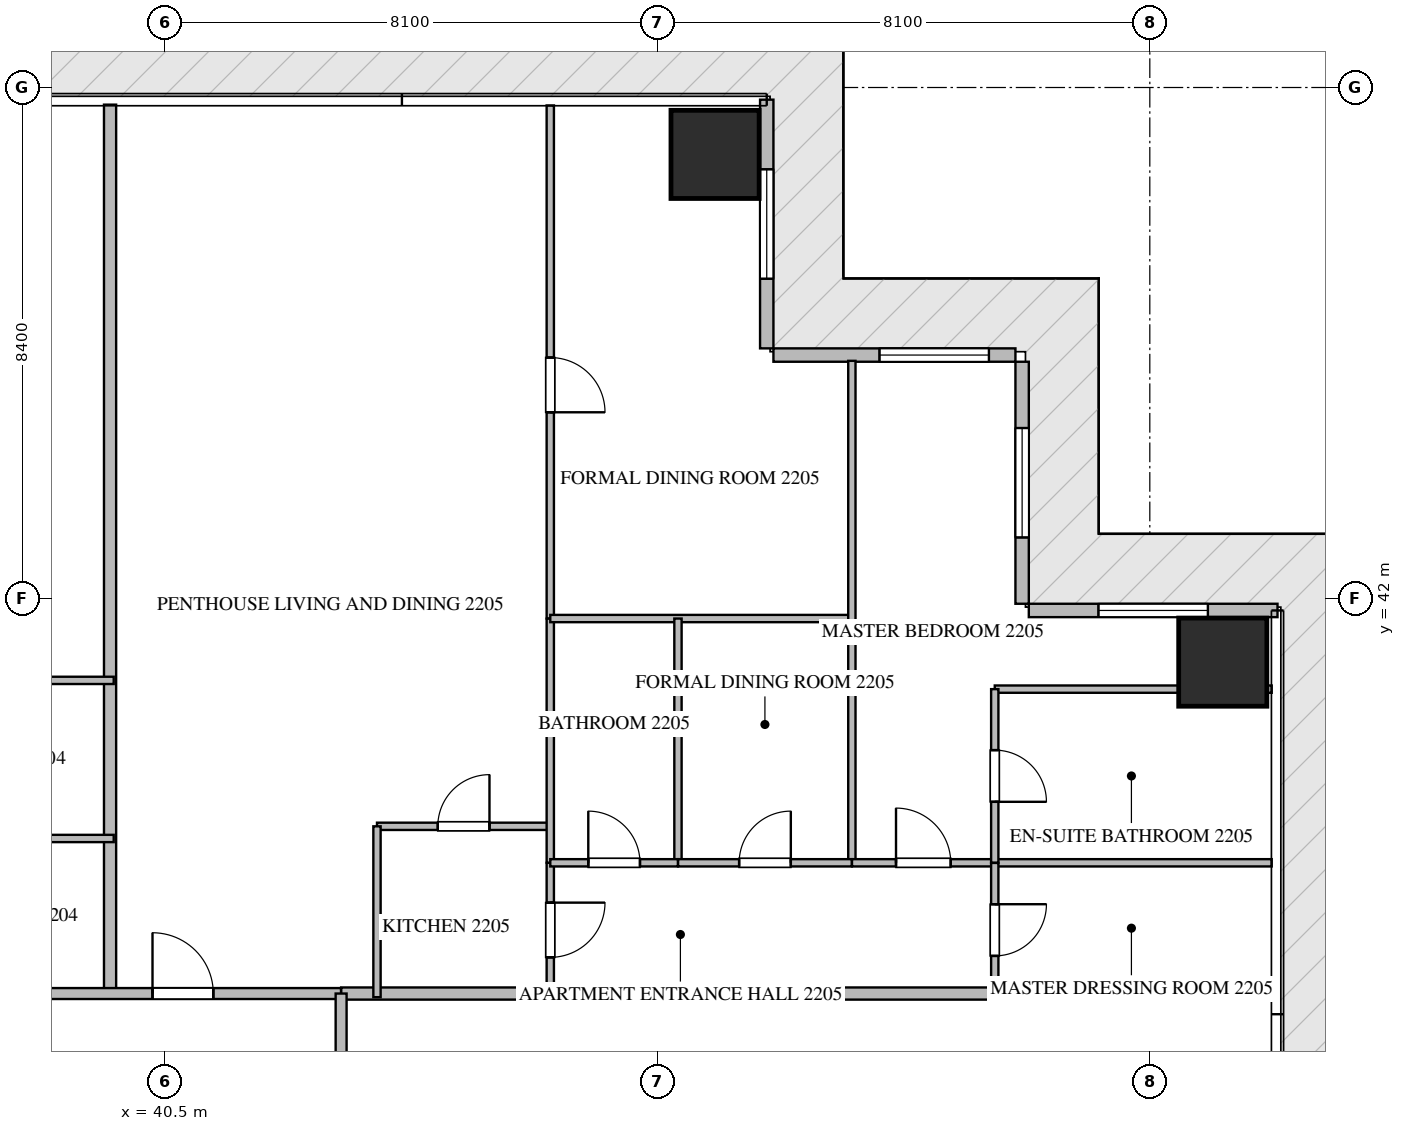
"""IFC4 building model, lengths in metres.
Left out: names, types, materials, properties, quantities, classifications, styles, units other than length and angle.
Written with IfcOpenShell. Run it as: python <this file> out.ifc"""

import sys

from ifc_helpers import new_model, si_unit, direction, frame, frame_2d, origin, origin_2d, place, context, subcontext, project, spatial, rectangle, extrude, source, transform, mapped, element, fill, save


model = new_model("IFC4")
c1 = context("Model", 3, precision=1e-05, world=origin(), true_north=direction((0.0, 1.0)))
c2 = subcontext(c1, "Body", "Model", "MODEL_VIEW")
j1 = project(units=[si_unit("LENGTHUNIT", "METRE"), si_unit("PLANEANGLEUNIT", "RADIAN")], contexts=[c1])
p1 = place(None, origin())
s1 = spatial("IfcSite", under=j1, at=p1, CompositionType="ELEMENT")
p2 = place(p1, origin())
s2 = spatial("IfcBuilding", under=s1, at=p2, CompositionType="ELEMENT")
p3 = place(p2, frame((0.0, 0.0, 90.45)))
s3 = spatial("IfcBuildingStorey", under=s2, at=p3, CompositionType="ELEMENT", Elevation=90.45)
m1 = source(origin(), c2, "Body", "SweptSolid", [
    extrude(rectangle(XDim=1.45, YDim=1.45, at=origin_2d()), origin(), (0.0, 0.0, 1.0), 3.75),
])
for number, where, z_axis, x_axis in (
    (1, (49.55, 49.3, -0.26), (0.0, 0.0, 1.0), (1.0, 0.0, 0.0)),
    (2, (57.9, 40.95, -0.26), (0.0, 0.0, 1.0), (1.0, 0.0, 0.0)),
):
    element("IfcColumn", number, at=place(p3, frame(where, z_axis=z_axis, x_axis=x_axis)), inside=s3, PredefinedType="COLUMN", context=c2, shape_type="MappedRepresentation", body=[
        mapped(m1, transform((0.0, 0.0, 0.0), scale=1.0)),
    ])
p4 = place(p3, frame((58.8, 41.8, 0.0), z_axis=(0.0, 0.0, 1.0), x_axis=(-1.0, 0.0, 0.0)))
e3 = element("IfcWall", 3, at=p4, inside=s3, PredefinedType="ELEMENTEDWALL", context=c2, shape_type="SweptSolid", body=[
    extrude(rectangle(XDim=4.09, YDim=0.22, at=frame_2d((2.045, 0.0))), origin(), (0.0, 0.0, 1.0), 3.475),
])
p5 = place(p4, frame((1.145, 0.0, 0.65)))
e4 = element("IfcOpeningElement", 4, at=p5, cuts=e3, PredefinedType="OPENING", context=c2, shape_type="SweptSolid", body=[
    extrude(rectangle(XDim=1.8, YDim=2.1, at=frame_2d((0.9, 1.05))), frame((0.0, 0.12, 0.0), z_axis=(0.0, -1.0, 0.0), x_axis=(1.0, 0.0, 0.0)), (0.0, 0.0, 1.0), 0.24),
])
p6 = place(p3, frame((54.6, 41.91, 0.0), z_axis=(0.0, 0.0, 1.0), x_axis=(0.0, 1.0, 0.0)))
e5 = element("IfcWall", 5, at=p6, inside=s3, PredefinedType="ELEMENTEDWALL", context=c2, shape_type="SweptSolid", body=[
    extrude(rectangle(XDim=3.98, YDim=0.22, at=frame_2d((1.99, 0.0))), origin(), (0.0, 0.0, 1.0), 3.475),
])
p7 = place(p6, frame((1.09, 0.0, 0.65)))
e6 = element("IfcOpeningElement", 6, at=p7, cuts=e5, PredefinedType="OPENING", context=c2, shape_type="SweptSolid", body=[
    extrude(rectangle(XDim=1.8, YDim=2.1, at=frame_2d((0.9, 1.05))), frame((0.0, 0.12, 0.0), z_axis=(0.0, -1.0, 0.0), x_axis=(1.0, 0.0, 0.0)), (0.0, 0.0, 1.0), 0.24),
])
p8 = place(p3, frame((54.49, 46.0, 0.0), z_axis=(0.0, 0.0, 1.0), x_axis=(-1.0, 0.0, 0.0)))
e7 = element("IfcWall", 7, at=p8, inside=s3, PredefinedType="ELEMENTEDWALL", context=c2, shape_type="SweptSolid", body=[
    extrude(rectangle(XDim=3.98, YDim=0.22, at=frame_2d((1.99, 0.0))), origin(), (0.0, 0.0, 1.0), 3.475),
])
p9 = place(p8, frame((0.436, 0.0, 0.65)))
e8 = element("IfcOpeningElement", 8, at=p9, cuts=e7, PredefinedType="OPENING", context=c2, shape_type="SweptSolid", body=[
    extrude(rectangle(XDim=1.8, YDim=2.1, at=frame_2d((0.9, 1.05))), frame((0.0, 0.12, 0.0), z_axis=(0.0, -1.0, 0.0), x_axis=(1.0, 0.0, 0.0)), (0.0, 0.0, 1.0), 0.24),
])
p10 = place(p3, frame((50.4, 46.11, 0.0), z_axis=(0.0, 0.0, 1.0), x_axis=(0.0, 1.0, 0.0)))
e9 = element("IfcWall", 9, at=p10, inside=s3, PredefinedType="ELEMENTEDWALL", context=c2, shape_type="SweptSolid", body=[
    extrude(rectangle(XDim=4.09, YDim=0.22, at=frame_2d((2.045, 0.0))), origin(), (0.0, 0.0, 1.0), 3.475),
])
p11 = place(p10, frame((1.145, 0.0, 0.65)))
e10 = element("IfcOpeningElement", 10, at=p11, cuts=e9, PredefinedType="OPENING", context=c2, shape_type="SweptSolid", body=[
    extrude(rectangle(XDim=1.8, YDim=2.1, at=frame_2d((0.9, 1.05))), frame((0.0, 0.12, 0.0), z_axis=(0.0, -1.0, 0.0), x_axis=(1.0, 0.0, 0.0)), (0.0, 0.0, 1.0), 0.24),
])
p12 = place(p3, frame((39.6, 35.5, 0.0), z_axis=(0.0, 0.0, 1.0), x_axis=(0.0, 1.0, 0.0)))
e11 = element("IfcWall", 11, at=p12, inside=s3, PredefinedType="PARTITIONING", context=c2, shape_type="SweptSolid", body=[
    extrude(rectangle(XDim=14.618, YDim=0.2, at=frame_2d((7.309, 0.0))), origin(), (0.0, 0.0, 1.0), 3.49),
])
p13 = place(p3, frame((43.4, 35.5, 0.0), z_axis=(0.0, 0.0, 1.0), x_axis=(1.0, 0.0, 0.0)))
e12 = element("IfcWall", 12, at=p13, inside=s3, PredefinedType="PARTITIONING", context=c2, shape_type="SweptSolid", body=[
    extrude(rectangle(XDim=15.318, YDim=0.2, at=frame_2d((7.659, 0.0))), origin(), (0.0, 0.0, 1.0), 3.49),
])
p14 = place(p3, frame((21.402, 35.5, 0.0), z_axis=(0.0, 0.0, 1.0), x_axis=(1.0, 0.0, 0.0)))
e13 = element("IfcWall", 13, at=p14, inside=s3, PredefinedType="PARTITIONING", context=c2, shape_type="SweptSolid", body=[
    extrude(rectangle(XDim=21.996, YDim=0.18, at=frame_2d((10.998, 0.0))), origin(), (0.0, 0.0, 1.0), 3.49),
])
p15 = place(p14, frame((1.96, 0.0, 0.0)))
e14 = element("IfcOpeningElement", 14, at=p15, cuts=e13, PredefinedType="OPENING", context=c2, shape_type="SweptSolid", body=[
    extrude(rectangle(XDim=1.0, YDim=2.15, at=frame_2d((0.5, 1.075))), frame((0.0, 0.1, 0.0), z_axis=(0.0, -1.0, 0.0), x_axis=(1.0, 0.0, 0.0)), (0.0, 0.0, 1.0), 0.2),
])
p16 = place(p14, frame((5.249, 0.0, 0.0)))
e15 = element("IfcOpeningElement", 15, at=p16, cuts=e13, PredefinedType="OPENING", context=c2, shape_type="SweptSolid", body=[
    extrude(rectangle(XDim=1.0, YDim=2.15, at=frame_2d((0.5, 1.075))), frame((0.0, 0.1, 0.0), z_axis=(0.0, -1.0, 0.0), x_axis=(1.0, 0.0, 0.0)), (0.0, 0.0, 1.0), 0.2),
])
p17 = place(p14, frame((11.653, 0.0, 0.0)))
e16 = element("IfcOpeningElement", 16, at=p17, cuts=e13, PredefinedType="OPENING", context=c2, shape_type="SweptSolid", body=[
    extrude(rectangle(XDim=1.0, YDim=2.15, at=frame_2d((0.5, 1.075))), frame((0.0, 0.1, 0.0), z_axis=(0.0, -1.0, 0.0), x_axis=(1.0, 0.0, 0.0)), (0.0, 0.0, 1.0), 0.2),
])
p18 = place(p14, frame((18.896, 0.0, 0.0)))
e17 = element("IfcOpeningElement", 17, at=p18, cuts=e13, PredefinedType="OPENING", context=c2, shape_type="SweptSolid", body=[
    extrude(rectangle(XDim=1.0, YDim=2.15, at=frame_2d((0.5, 1.075))), frame((0.0, 0.1, 0.0), z_axis=(0.0, -1.0, 0.0), x_axis=(1.0, 0.0, 0.0)), (0.0, 0.0, 1.0), 0.2),
])
p19 = place(p3, frame((43.4, 14.9, 0.0), z_axis=(0.0, 0.0, 1.0), x_axis=(0.0, 1.0, 0.0)))
e18 = element("IfcWall", 18, at=p19, inside=s3, PredefinedType="PARTITIONING", context=c2, shape_type="SweptSolid", body=[
    extrude(rectangle(XDim=20.6, YDim=0.18, at=frame_2d((10.3, 0.0))), origin(), (0.0, 0.0, 1.0), 3.49),
])
p20 = place(p19, frame((3.469, 0.0, 0.0)))
e19 = element("IfcOpeningElement", 19, at=p20, cuts=e18, PredefinedType="OPENING", context=c2, shape_type="SweptSolid", body=[
    extrude(rectangle(XDim=1.0, YDim=2.15, at=frame_2d((0.5, 1.075))), frame((0.0, 0.1, 0.0), z_axis=(0.0, -1.0, 0.0), x_axis=(1.0, 0.0, 0.0)), (0.0, 0.0, 1.0), 0.2),
])
p21 = place(p19, frame((11.074, 0.0, 0.0)))
e20 = element("IfcOpeningElement", 20, at=p21, cuts=e18, PredefinedType="OPENING", context=c2, shape_type="SweptSolid", body=[
    extrude(rectangle(XDim=1.0, YDim=2.15, at=frame_2d((0.5, 1.075))), frame((0.0, 0.1, 0.0), z_axis=(0.0, -1.0, 0.0), x_axis=(1.0, 0.0, 0.0)), (0.0, 0.0, 1.0), 0.2),
])
p22 = place(p19, frame((17.78, 0.0, 0.0)))
e21 = element("IfcOpeningElement", 21, at=p22, cuts=e18, PredefinedType="OPENING", context=c2, shape_type="SweptSolid", body=[
    extrude(rectangle(XDim=1.0, YDim=2.15, at=frame_2d((0.5, 1.075))), frame((0.0, 0.1, 0.0), z_axis=(0.0, -1.0, 0.0), x_axis=(1.0, 0.0, 0.0)), (0.0, 0.0, 1.0), 0.2),
])
for number, where, z_axis, x_axis in (
    (22, (35.3, 38.05, 0.0), (0.0, 0.0, 1.0), (1.0, 0.0, 0.0)),
    (23, (35.3, 40.65, 0.0), (0.0, 0.0, 1.0), (1.0, 0.0, 0.0)),
):
    element("IfcWall", number, at=place(p3, frame(where, z_axis=z_axis, x_axis=x_axis)), inside=s3, PredefinedType="PARTITIONING", context=c2, shape_type="SweptSolid", body=[
        extrude(rectangle(XDim=4.36, YDim=0.12, at=frame_2d((2.18, 0.0))), origin(), (0.0, 0.0, 1.0), 3.49),
    ])
p23 = place(p3, frame((43.99, 38.25, 0.0), z_axis=(0.0, 0.0, 1.0), x_axis=(1.0, 0.0, 0.0)))
e24 = element("IfcWall", 24, at=p23, inside=s3, PredefinedType="PARTITIONING", context=c2, shape_type="SweptSolid", body=[
    extrude(rectangle(XDim=2.85, YDim=0.12, at=frame_2d((1.425, 0.0))), origin(), (0.0, 0.0, 1.0), 3.49),
])
p24 = place(p23, frame((1.0, 0.0, 0.0)))
e25 = element("IfcOpeningElement", 25, at=p24, cuts=e24, PredefinedType="OPENING", context=c2, shape_type="SweptSolid", body=[
    extrude(rectangle(XDim=0.85, YDim=2.1, at=frame_2d((0.425, 1.05))), frame((0.0, 0.07, 0.0), z_axis=(0.0, -1.0, 0.0), x_axis=(1.0, 0.0, 0.0)), (0.0, 0.0, 1.0), 0.14),
])
p25 = place(p3, frame((43.99, 38.25, 0.0), z_axis=(0.0, 0.0, 1.0), x_axis=(0.0, -1.0, 0.0)))
e26 = element("IfcWall", 26, at=p25, inside=s3, PredefinedType="PARTITIONING", context=c2, shape_type="SweptSolid", body=[
    extrude(rectangle(XDim=2.81, YDim=0.12, at=frame_2d((1.405, 0.0))), origin(), (0.0, 0.0, 1.0), 3.49),
])
p26 = place(p3, frame((46.84, 37.65, 0.0), z_axis=(0.0, 0.0, 1.0), x_axis=(0.0, -1.0, 0.0)))
e27 = element("IfcWall", 27, at=p26, inside=s3, PredefinedType="PARTITIONING", context=c2, shape_type="SweptSolid", body=[
    extrude(rectangle(XDim=2.21, YDim=0.12, at=frame_2d((1.105, 0.0))), origin(), (0.0, 0.0, 1.0), 3.49),
])
p27 = place(p26, frame((0.655, 0.0, 0.0)))
e28 = element("IfcOpeningElement", 28, at=p27, cuts=e27, PredefinedType="OPENING", context=c2, shape_type="SweptSolid", body=[
    extrude(rectangle(XDim=0.9, YDim=2.1, at=frame_2d((0.45, 1.05))), frame((0.0, 0.07, 0.0), z_axis=(0.0, -1.0, 0.0), x_axis=(1.0, 0.0, 0.0)), (0.0, 0.0, 1.0), 0.14),
])
p28 = place(p3, frame((46.84, 50.105, 0.0), z_axis=(0.0, 0.0, 1.0), x_axis=(0.0, -1.0, 0.0)))
e29 = element("IfcWall", 29, at=p28, inside=s3, PredefinedType="PARTITIONING", context=c2, shape_type="SweptSolid", body=[
    extrude(rectangle(XDim=8.438, YDim=0.12, at=frame_2d((4.219, 0.0))), origin(), (0.0, 0.0, 1.0), 3.49),
])
p29 = place(p28, frame((4.146, 0.0, 0.0)))
e30 = element("IfcOpeningElement", 30, at=p29, cuts=e29, PredefinedType="OPENING", context=c2, shape_type="SweptSolid", body=[
    extrude(rectangle(XDim=0.9, YDim=2.1, at=frame_2d((0.45, 1.05))), frame((0.0, 0.07, 0.0), z_axis=(0.0, -1.0, 0.0), x_axis=(1.0, 0.0, 0.0)), (0.0, 0.0, 1.0), 0.14),
])
p30 = place(p3, frame((46.84, 41.665, 0.0), z_axis=(0.0, 0.0, 1.0), x_axis=(0.0, -1.0, 0.0)))
e31 = element("IfcWall", 31, at=p30, inside=s3, PredefinedType="PARTITIONING", context=c2, shape_type="SweptSolid", body=[
    extrude(rectangle(XDim=4.013, YDim=0.12, at=frame_2d((2.006, 0.0))), origin(), (0.0, 0.0, 1.0), 3.49),
])
p31 = place(p3, frame((46.84, 41.667, 0.0), z_axis=(0.0, 0.0, 1.0), x_axis=(1.0, 0.0, 0.0)))
e32 = element("IfcWall", 32, at=p31, inside=s3, PredefinedType="PARTITIONING", context=c2, shape_type="SweptSolid", body=[
    extrude(rectangle(XDim=4.96, YDim=0.12, at=frame_2d((2.48, 0.0))), origin(), (0.0, 0.0, 1.0), 3.49),
])
p32 = place(p3, frame((51.8, 45.905, 0.0), z_axis=(0.0, 0.0, 1.0), x_axis=(0.0, -1.0, 0.0)))
e33 = element("IfcWall", 33, at=p32, inside=s3, PredefinedType="PARTITIONING", context=c2, shape_type="SweptSolid", body=[
    extrude(rectangle(XDim=8.255, YDim=0.12, at=frame_2d((4.127, 0.0))), origin(), (0.0, 0.0, 1.0), 3.49),
])
p33 = place(p3, frame((48.94, 41.667, 0.0), z_axis=(0.0, 0.0, 1.0), x_axis=(0.0, -1.0, 0.0)))
e34 = element("IfcWall", 34, at=p33, inside=s3, PredefinedType="PARTITIONING", context=c2, shape_type="SweptSolid", body=[
    extrude(rectangle(XDim=4.017, YDim=0.12, at=frame_2d((2.009, 0.0))), origin(), (0.0, 0.0, 1.0), 3.49),
])
p34 = place(p3, frame((46.84, 37.65, 0.0), z_axis=(0.0, 0.0, 1.0), x_axis=(1.0, 0.0, 0.0)))
e35 = element("IfcWall", 35, at=p34, inside=s3, PredefinedType="PARTITIONING", context=c2, shape_type="SweptSolid", body=[
    extrude(rectangle(XDim=2.1, YDim=0.12, at=frame_2d((1.05, 0.0))), origin(), (0.0, 0.0, 1.0), 3.49),
])
p35 = place(p34, frame((0.625, 0.0, 0.0)))
e36 = element("IfcOpeningElement", 36, at=p35, cuts=e35, PredefinedType="OPENING", context=c2, shape_type="SweptSolid", body=[
    extrude(rectangle(XDim=0.85, YDim=2.1, at=frame_2d((0.425, 1.05))), frame((0.0, 0.07, 0.0), z_axis=(0.0, -1.0, 0.0), x_axis=(1.0, 0.0, 0.0)), (0.0, 0.0, 1.0), 0.14),
])
p36 = place(p3, frame((48.942, 37.65, 0.0), z_axis=(0.0, 0.0, 1.0), x_axis=(1.0, 0.0, 0.0)))
e37 = element("IfcWall", 37, at=p36, inside=s3, PredefinedType="PARTITIONING", context=c2, shape_type="SweptSolid", body=[
    extrude(rectangle(XDim=2.858, YDim=0.12, at=frame_2d((1.429, 0.0))), origin(), (0.0, 0.0, 1.0), 3.49),
])
p37 = place(p36, frame((1.004, 0.0, 0.0)))
e38 = element("IfcOpeningElement", 38, at=p37, cuts=e37, PredefinedType="OPENING", context=c2, shape_type="SweptSolid", body=[
    extrude(rectangle(XDim=0.85, YDim=2.1, at=frame_2d((0.425, 1.05))), frame((0.0, 0.07, 0.0), z_axis=(0.0, -1.0, 0.0), x_axis=(1.0, 0.0, 0.0)), (0.0, 0.0, 1.0), 0.14),
])
p38 = place(p3, frame((51.802, 37.65, 0.0), z_axis=(0.0, 0.0, 1.0), x_axis=(1.0, 0.0, 0.0)))
e39 = element("IfcWall", 39, at=p38, inside=s3, PredefinedType="PARTITIONING", context=c2, shape_type="SweptSolid", body=[
    extrude(rectangle(XDim=2.348, YDim=0.12, at=frame_2d((1.174, 0.0))), origin(), (0.0, 0.0, 1.0), 3.49),
])
p39 = place(p38, frame((0.724, 0.0, 0.0)))
e40 = element("IfcOpeningElement", 40, at=p39, cuts=e39, PredefinedType="OPENING", context=c2, shape_type="SweptSolid", body=[
    extrude(rectangle(XDim=0.9, YDim=2.1, at=frame_2d((0.45, 1.05))), frame((0.0, 0.07, 0.0), z_axis=(0.0, -1.0, 0.0), x_axis=(1.0, 0.0, 0.0)), (0.0, 0.0, 1.0), 0.14),
])
p40 = place(p3, frame((54.15, 40.506, 0.0), z_axis=(0.0, 0.0, 1.0), x_axis=(1.0, 0.0, 0.0)))
e41 = element("IfcWall", 41, at=p40, inside=s3, PredefinedType="PARTITIONING", context=c2, shape_type="SweptSolid", body=[
    extrude(rectangle(XDim=4.555, YDim=0.12, at=frame_2d((2.278, 0.0))), origin(), (0.0, 0.0, 1.0), 3.49),
])
p41 = place(p3, frame((54.152, 37.65, 0.0), z_axis=(0.0, 0.0, 1.0), x_axis=(1.0, 0.0, 0.0)))
e42 = element("IfcWall", 42, at=p41, inside=s3, PredefinedType="PARTITIONING", context=c2, shape_type="SweptSolid", body=[
    extrude(rectangle(XDim=4.553, YDim=0.12, at=frame_2d((2.276, 0.0))), origin(), (0.0, 0.0, 1.0), 3.49),
])
p42 = place(p3, frame((54.15, 40.506, 0.0), z_axis=(0.0, 0.0, 1.0), x_axis=(0.0, -1.0, 0.0)))
e43 = element("IfcWall", 43, at=p42, inside=s3, PredefinedType="PARTITIONING", context=c2, shape_type="SweptSolid", body=[
    extrude(rectangle(XDim=2.856, YDim=0.12, at=frame_2d((1.428, 0.0))), origin(), (0.0, 0.0, 1.0), 3.49),
])
p43 = place(p42, frame((1.003, 0.0, 0.0)))
e44 = element("IfcOpeningElement", 44, at=p43, cuts=e43, PredefinedType="OPENING", context=c2, shape_type="SweptSolid", body=[
    extrude(rectangle(XDim=0.85, YDim=2.1, at=frame_2d((0.425, 1.05))), frame((0.0, 0.07, 0.0), z_axis=(0.0, -1.0, 0.0), x_axis=(1.0, 0.0, 0.0)), (0.0, 0.0, 1.0), 0.14),
])
p44 = place(p3, frame((54.15, 37.648, 0.0), z_axis=(0.0, 0.0, 1.0), x_axis=(0.0, -1.0, 0.0)))
e45 = element("IfcWall", 45, at=p44, inside=s3, PredefinedType="PARTITIONING", context=c2, shape_type="SweptSolid", body=[
    extrude(rectangle(XDim=2.208, YDim=0.12, at=frame_2d((1.104, 0.0))), origin(), (0.0, 0.0, 1.0), 3.49),
])
p45 = place(p44, frame((0.679, 0.0, 0.0)))
e46 = element("IfcOpeningElement", 46, at=p45, cuts=e45, PredefinedType="OPENING", context=c2, shape_type="SweptSolid", body=[
    extrude(rectangle(XDim=0.85, YDim=2.1, at=frame_2d((0.425, 1.05))), frame((0.0, 0.07, 0.0), z_axis=(0.0, -1.0, 0.0), x_axis=(1.0, 0.0, 0.0)), (0.0, 0.0, 1.0), 0.14),
])
m2 = source(origin(), c2, "Body", "SweptSolid", [
    extrude(rectangle(XDim=1.8, YDim=2.1, at=frame_2d((0.9, 1.05))), frame((0.0, 0.03, 0.0), z_axis=(0.0, -1.0, 0.0), x_axis=(1.0, 0.0, 0.0)), (0.0, 0.0, 1.0), 0.06),
])
p46 = place(p5, origin())
e47 = element("IfcWindow", 47, at=p46, inside=s3, PartitioningType="SINGLE_PANEL", PredefinedType="WINDOW", context=c2, shape_type="MappedRepresentation", body=[
    mapped(m2, transform((0.0, 0.0, 0.0), scale=1.0)),
])
fill(e4, e47)
p47 = place(p7, origin())
e48 = element("IfcWindow", 48, at=p47, inside=s3, PartitioningType="SINGLE_PANEL", PredefinedType="WINDOW", context=c2, shape_type="MappedRepresentation", body=[
    mapped(m2, transform((0.0, 0.0, 0.0), scale=1.0)),
])
fill(e6, e48)
p48 = place(p9, origin())
e49 = element("IfcWindow", 49, at=p48, inside=s3, PartitioningType="SINGLE_PANEL", PredefinedType="WINDOW", context=c2, shape_type="MappedRepresentation", body=[
    mapped(m2, transform((0.0, 0.0, 0.0), scale=1.0)),
])
fill(e8, e49)
p49 = place(p11, origin())
e50 = element("IfcWindow", 50, at=p49, inside=s3, PartitioningType="SINGLE_PANEL", PredefinedType="WINDOW", context=c2, shape_type="MappedRepresentation", body=[
    mapped(m2, transform((0.0, 0.0, 0.0), scale=1.0)),
])
fill(e10, e50)
m3 = source(origin(), c2, "Body", "SweptSolid", [
    extrude(rectangle(XDim=1.0, YDim=2.15, at=frame_2d((0.5, 1.075))), frame((0.0, 0.025, 0.0), z_axis=(0.0, -1.0, 0.0), x_axis=(1.0, 0.0, 0.0)), (0.0, 0.0, 1.0), 0.05),
])
p50 = place(p18, origin())
e51 = element("IfcDoor", 51, at=p50, inside=s3, OperationType="SINGLE_SWING_LEFT", PredefinedType="DOOR", context=c2, shape_type="MappedRepresentation", body=[
    mapped(m3, transform((0.0, 0.0, 0.0), scale=1.0)),
])
fill(e17, e51)
m4 = source(origin(), c2, "Body", "SweptSolid", [
    extrude(rectangle(XDim=0.85, YDim=2.1, at=frame_2d((0.425, 1.05))), frame((0.0, 0.025, 0.0), z_axis=(0.0, -1.0, 0.0), x_axis=(1.0, 0.0, 0.0)), (0.0, 0.0, 1.0), 0.05),
])
p51 = place(p24, origin())
e52 = element("IfcDoor", 52, at=p51, inside=s3, OperationType="SINGLE_SWING_RIGHT", PredefinedType="DOOR", context=c2, shape_type="MappedRepresentation", body=[
    mapped(m4, transform((0.0, 0.0, 0.0), scale=1.0)),
])
fill(e25, e52)
m5 = source(origin(), c2, "Body", "SweptSolid", [
    extrude(rectangle(XDim=0.9, YDim=2.1, at=frame_2d((0.45, 1.05))), frame((0.0, 0.025, 0.0), z_axis=(0.0, -1.0, 0.0), x_axis=(1.0, 0.0, 0.0)), (0.0, 0.0, 1.0), 0.05),
])
p52 = place(p27, origin())
e53 = element("IfcDoor", 53, at=p52, inside=s3, OperationType="SINGLE_SWING_LEFT", PredefinedType="DOOR", context=c2, shape_type="MappedRepresentation", body=[
    mapped(m5, transform((0.0, 0.0, 0.0), scale=1.0)),
])
fill(e28, e53)
p53 = place(p29, origin())
e54 = element("IfcDoor", 54, at=p53, inside=s3, OperationType="SINGLE_SWING_RIGHT", PredefinedType="DOOR", context=c2, shape_type="MappedRepresentation", body=[
    mapped(m5, transform((0.0, 0.0, 0.0), scale=1.0)),
])
fill(e30, e54)
p54 = place(p35, origin())
e55 = element("IfcDoor", 55, at=p54, inside=s3, OperationType="SINGLE_SWING_LEFT", PredefinedType="DOOR", context=c2, shape_type="MappedRepresentation", body=[
    mapped(m4, transform((0.0, 0.0, 0.0), scale=1.0)),
])
fill(e36, e55)
p55 = place(p37, origin())
e56 = element("IfcDoor", 56, at=p55, inside=s3, OperationType="SINGLE_SWING_RIGHT", PredefinedType="DOOR", context=c2, shape_type="MappedRepresentation", body=[
    mapped(m4, transform((0.0, 0.0, 0.0), scale=1.0)),
])
fill(e38, e56)
p56 = place(p39, origin())
e57 = element("IfcDoor", 57, at=p56, inside=s3, OperationType="SINGLE_SWING_LEFT", PredefinedType="DOOR", context=c2, shape_type="MappedRepresentation", body=[
    mapped(m5, transform((0.0, 0.0, 0.0), scale=1.0)),
])
fill(e40, e57)
p57 = place(p43, origin())
e58 = element("IfcDoor", 58, at=p57, inside=s3, OperationType="SINGLE_SWING_RIGHT", PredefinedType="DOOR", context=c2, shape_type="MappedRepresentation", body=[
    mapped(m4, transform((0.0, 0.0, 0.0), scale=1.0)),
])
fill(e44, e58)
p58 = place(p45, origin())
e59 = element("IfcDoor", 59, at=p58, inside=s3, OperationType="SINGLE_SWING_LEFT", PredefinedType="DOOR", context=c2, shape_type="MappedRepresentation", body=[
    mapped(m4, transform((0.0, 0.0, 0.0), scale=1.0)),
])
fill(e46, e59)
save(model, sys.argv[1])
